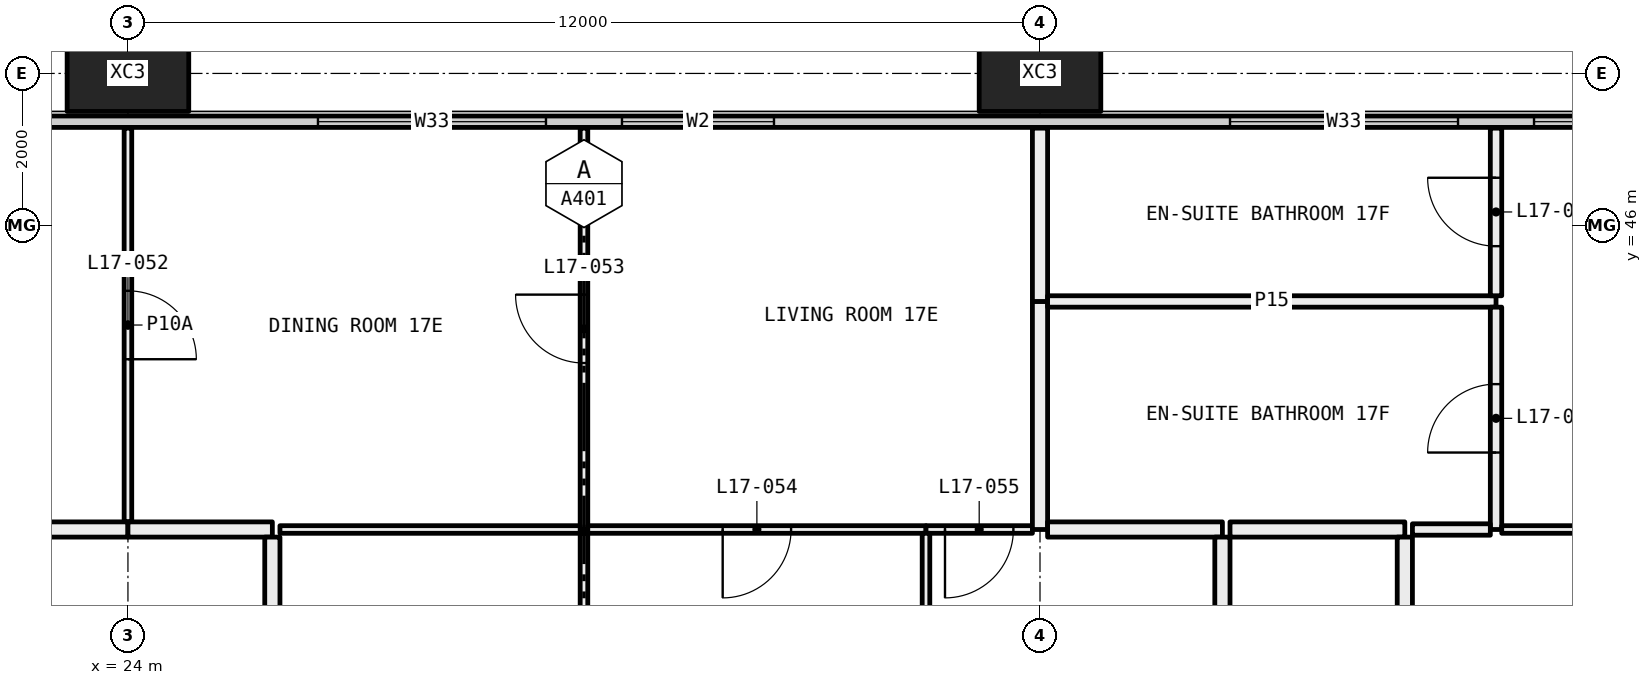
"""IFC4 building model, lengths in metres.
Left out: names, types, materials, properties, quantities, classifications, styles, units other than length and angle.
Written with IfcOpenShell. Run it as: python <this file> out.ifc"""

import sys

from ifc_helpers import new_model, si_unit, direction, frame, frame_2d, origin, origin_2d, place, context, subcontext, project, spatial, rectangle, hollow_rectangle, extrude, element, fill, save


model = new_model("IFC4")
c1 = context("Model", 3, precision=1e-05, world=origin(), true_north=direction((0.0, 1.0)))
c2 = subcontext(c1, "Body", "Model", "MODEL_VIEW")
j1 = project(units=[si_unit("LENGTHUNIT", "METRE"), si_unit("PLANEANGLEUNIT", "RADIAN")], contexts=[c1])
p1 = place(None, origin())
s1 = spatial("IfcSite", under=j1, at=p1, CompositionType="ELEMENT")
p2 = place(p1, origin())
s2 = spatial("IfcBuilding", under=s1, at=p2, CompositionType="ELEMENT")
p3 = place(p2, frame((0.0, 0.0, 71.4)))
s3 = spatial("IfcBuildingStorey", under=s2, at=p3, CompositionType="ELEMENT", Elevation=71.4)
for number, where, z_axis, x_axis in (
    (1, (24.0, 48.0, -0.4), (0.0, 0.0, 1.0), (1.0, 0.0, 0.0)),
    (2, (36.0, 48.0, -0.4), (0.0, 0.0, 1.0), (1.0, 0.0, 0.0)),
):
    element("IfcColumn", number, at=place(p3, frame(where, z_axis=z_axis, x_axis=x_axis)), inside=s3, PredefinedType="COLUMN", context=c2, shape_type="SweptSolid", body=[
        extrude(hollow_rectangle(XDim=1.6, YDim=1.0, WallThickness=0.065, at=origin_2d()), origin(), (0.0, 0.0, 1.0), 3.45),
    ])
p4 = place(p3, frame((6.56, 47.365, 0.0), z_axis=(0.0, 0.0, 1.0), x_axis=(1.0, 0.0, 0.0)))
e3 = element("IfcWall", 3, at=p4, inside=s3, PredefinedType="ELEMENTEDWALL", context=c2, shape_type="SweptSolid", body=[
    extrude(rectangle(XDim=58.88, YDim=0.15, at=frame_2d((29.44, 0.0))), origin(), (0.0, 0.0, 1.0), 3.05),
])
p5 = place(p4, frame((0.44, 0.0, 0.45)))
e4 = element("IfcOpeningElement", 4, at=p5, cuts=e3, PredefinedType="OPENING", context=c2, shape_type="SweptSolid", body=[
    extrude(rectangle(XDim=4.5, YDim=2.55, at=frame_2d((2.25, 1.275))), frame((0.0, 0.085, 0.0), z_axis=(0.0, -1.0, 0.0), x_axis=(1.0, 0.0, 0.0)), (0.0, 0.0, 1.0), 0.17),
])
p6 = place(p4, frame((7.94, 0.0, 0.45)))
e5 = element("IfcOpeningElement", 5, at=p6, cuts=e3, PredefinedType="OPENING", context=c2, shape_type="SweptSolid", body=[
    extrude(rectangle(XDim=3.0, YDim=2.55, at=frame_2d((1.5, 1.275))), frame((0.0, 0.085, 0.0), z_axis=(0.0, -1.0, 0.0), x_axis=(1.0, 0.0, 0.0)), (0.0, 0.0, 1.0), 0.17),
])
p7 = place(p4, frame((11.94, 0.0, 0.45)))
e6 = element("IfcOpeningElement", 6, at=p7, cuts=e3, PredefinedType="OPENING", context=c2, shape_type="SweptSolid", body=[
    extrude(rectangle(XDim=3.0, YDim=2.55, at=frame_2d((1.5, 1.275))), frame((0.0, 0.085, 0.0), z_axis=(0.0, -1.0, 0.0), x_axis=(1.0, 0.0, 0.0)), (0.0, 0.0, 1.0), 0.17),
])
p8 = place(p4, frame((19.94, 0.0, 0.45)))
e7 = element("IfcOpeningElement", 7, at=p8, cuts=e3, PredefinedType="OPENING", context=c2, shape_type="SweptSolid", body=[
    extrude(rectangle(XDim=3.0, YDim=2.55, at=frame_2d((1.5, 1.275))), frame((0.0, 0.085, 0.0), z_axis=(0.0, -1.0, 0.0), x_axis=(1.0, 0.0, 0.0)), (0.0, 0.0, 1.0), 0.17),
])
p9 = place(p4, frame((23.94, 0.0, 0.45)))
e8 = element("IfcOpeningElement", 8, at=p9, cuts=e3, PredefinedType="OPENING", context=c2, shape_type="SweptSolid", body=[
    extrude(rectangle(XDim=2.0, YDim=2.55, at=frame_2d((1.0, 1.275))), frame((0.0, 0.085, 0.0), z_axis=(0.0, -1.0, 0.0), x_axis=(1.0, 0.0, 0.0)), (0.0, 0.0, 1.0), 0.17),
])
p10 = place(p4, frame((31.94, 0.0, 0.45)))
e9 = element("IfcOpeningElement", 9, at=p10, cuts=e3, PredefinedType="OPENING", context=c2, shape_type="SweptSolid", body=[
    extrude(rectangle(XDim=3.0, YDim=2.55, at=frame_2d((1.5, 1.275))), frame((0.0, 0.085, 0.0), z_axis=(0.0, -1.0, 0.0), x_axis=(1.0, 0.0, 0.0)), (0.0, 0.0, 1.0), 0.17),
])
p11 = place(p4, frame((35.94, 0.0, 0.45)))
e10 = element("IfcOpeningElement", 10, at=p11, cuts=e3, PredefinedType="OPENING", context=c2, shape_type="SweptSolid", body=[
    extrude(rectangle(XDim=3.0, YDim=2.55, at=frame_2d((1.5, 1.275))), frame((0.0, 0.085, 0.0), z_axis=(0.0, -1.0, 0.0), x_axis=(1.0, 0.0, 0.0)), (0.0, 0.0, 1.0), 0.17),
])
p12 = place(p4, frame((43.94, 0.0, 0.45)))
e11 = element("IfcOpeningElement", 11, at=p12, cuts=e3, PredefinedType="OPENING", context=c2, shape_type="SweptSolid", body=[
    extrude(rectangle(XDim=3.0, YDim=2.55, at=frame_2d((1.5, 1.275))), frame((0.0, 0.085, 0.0), z_axis=(0.0, -1.0, 0.0), x_axis=(1.0, 0.0, 0.0)), (0.0, 0.0, 1.0), 0.17),
])
p13 = place(p4, frame((47.94, 0.0, 0.45)))
e12 = element("IfcOpeningElement", 12, at=p13, cuts=e3, PredefinedType="OPENING", context=c2, shape_type="SweptSolid", body=[
    extrude(rectangle(XDim=2.0, YDim=2.55, at=frame_2d((1.0, 1.275))), frame((0.0, 0.085, 0.0), z_axis=(0.0, -1.0, 0.0), x_axis=(1.0, 0.0, 0.0)), (0.0, 0.0, 1.0), 0.17),
])
p14 = place(p4, frame((53.94, 0.0, 0.45)))
e13 = element("IfcOpeningElement", 13, at=p14, cuts=e3, PredefinedType="OPENING", context=c2, shape_type="SweptSolid", body=[
    extrude(rectangle(XDim=4.5, YDim=2.55, at=frame_2d((2.25, 1.275))), frame((0.0, 0.085, 0.0), z_axis=(0.0, -1.0, 0.0), x_axis=(1.0, 0.0, 0.0)), (0.0, 0.0, 1.0), 0.17),
])
p15 = place(p3, frame((24.0, 42.1, 0.0), z_axis=(0.0, 0.0, 1.0), x_axis=(0.0, 1.0, 0.0)))
e14 = element("IfcWall", 14, at=p15, inside=s3, PredefinedType="PARTITIONING", context=c2, shape_type="SweptSolid", body=[
    extrude(rectangle(XDim=5.18, YDim=0.1, at=frame_2d((2.59, 0.0))), origin(), (0.0, 0.0, 1.0), 3.05),
])
p16 = place(p15, frame((2.14, 0.0, 0.0)))
e15 = element("IfcOpeningElement", 15, at=p16, cuts=e14, PredefinedType="OPENING", context=c2, shape_type="SweptSolid", body=[
    extrude(rectangle(XDim=0.9, YDim=2.1, at=frame_2d((0.45, 1.05))), frame((0.0, 0.06, 0.0), z_axis=(0.0, -1.0, 0.0), x_axis=(1.0, 0.0, 0.0)), (0.0, 0.0, 1.0), 0.12),
])
p17 = place(p3, frame((18.0, 42.0, 0.0), z_axis=(0.0, 0.0, 1.0), x_axis=(1.0, 0.0, 0.0)))
e16 = element("IfcWall", 16, at=p17, inside=s3, PredefinedType="PARTITIONING", context=c2, shape_type="SweptSolid", body=[
    extrude(rectangle(XDim=6.0, YDim=0.2, at=frame_2d((3.0, 0.0))), origin(), (0.0, 0.0, 1.0), 3.05),
])
p18 = place(p17, frame((2.5, 0.0, 0.0)))
e17 = element("IfcOpeningElement", 17, at=p18, cuts=e16, PredefinedType="OPENING", context=c2, shape_type="SweptSolid", body=[
    extrude(rectangle(XDim=1.0, YDim=2.1, at=frame_2d((0.5, 1.05))), frame((0.0, 0.11, 0.0), z_axis=(0.0, -1.0, 0.0), x_axis=(1.0, 0.0, 0.0)), (0.0, 0.0, 1.0), 0.22),
])
p19 = place(p3, frame((30.0, 42.0, 0.0), z_axis=(0.0, 0.0, 1.0), x_axis=(0.0, 1.0, 0.0)))
e18 = element("IfcWall", 18, at=p19, inside=s3, PredefinedType="PARTITIONING", context=c2, shape_type="SweptSolid", body=[
    extrude(rectangle(XDim=5.28, YDim=0.1, at=frame_2d((2.64, 0.0))), origin(), (0.0, 0.0, 1.0), 3.05),
])
p20 = place(p19, frame((2.19, 0.0, 0.0)))
e19 = element("IfcOpeningElement", 19, at=p20, cuts=e18, PredefinedType="OPENING", context=c2, shape_type="SweptSolid", body=[
    extrude(rectangle(XDim=0.9, YDim=2.1, at=frame_2d((0.45, 1.05))), frame((0.0, 0.06, 0.0), z_axis=(0.0, -1.0, 0.0), x_axis=(1.0, 0.0, 0.0)), (0.0, 0.0, 1.0), 0.12),
])
p21 = place(p3, frame((26.0, 42.0, 0.0), z_axis=(0.0, 0.0, 1.0), x_axis=(1.0, 0.0, 0.0)))
e20 = element("IfcWall", 20, at=p21, inside=s3, PredefinedType="PARTITIONING", context=c2, shape_type="SweptSolid", body=[
    extrude(rectangle(XDim=3.95, YDim=0.1, at=frame_2d((1.975, 0.0))), origin(), (0.0, 0.0, 1.0), 3.05),
])
p22 = place(p3, frame((24.0, 42.0, 0.0), z_axis=(0.0, 0.0, 1.0), x_axis=(1.0, 0.0, 0.0)))
e21 = element("IfcWall", 21, at=p22, inside=s3, PredefinedType="PARTITIONING", context=c2, shape_type="SweptSolid", body=[
    extrude(rectangle(XDim=1.9, YDim=0.2, at=frame_2d((0.95, 0.0))), origin(), (0.0, 0.0, 1.0), 3.05),
])
p23 = place(p3, frame((30.05, 42.0, 0.0), z_axis=(0.0, 0.0, 1.0), x_axis=(1.0, 0.0, 0.0)))
e22 = element("IfcWall", 22, at=p23, inside=s3, PredefinedType="PARTITIONING", context=c2, shape_type="SweptSolid", body=[
    extrude(rectangle(XDim=4.45, YDim=0.1, at=frame_2d((2.225, 0.0))), origin(), (0.0, 0.0, 1.0), 3.05),
])
p24 = place(p23, frame((1.775, 0.0, 0.0)))
e23 = element("IfcOpeningElement", 23, at=p24, cuts=e22, PredefinedType="OPENING", context=c2, shape_type="SweptSolid", body=[
    extrude(rectangle(XDim=0.9, YDim=2.1, at=frame_2d((0.45, 1.05))), frame((0.0, 0.06, 0.0), z_axis=(0.0, -1.0, 0.0), x_axis=(1.0, 0.0, 0.0)), (0.0, 0.0, 1.0), 0.12),
])
p25 = place(p3, frame((34.5, 42.0, 0.0), z_axis=(0.0, 0.0, 1.0), x_axis=(1.0, 0.0, 0.0)))
e24 = element("IfcWall", 24, at=p25, inside=s3, PredefinedType="PARTITIONING", context=c2, shape_type="SweptSolid", body=[
    extrude(rectangle(XDim=1.4, YDim=0.1, at=frame_2d((0.7, 0.0))), origin(), (0.0, 0.0, 1.0), 3.05),
])
p26 = place(p25, frame((0.25, 0.0, 0.0)))
e25 = element("IfcOpeningElement", 25, at=p26, cuts=e24, PredefinedType="OPENING", context=c2, shape_type="SweptSolid", body=[
    extrude(rectangle(XDim=0.9, YDim=2.1, at=frame_2d((0.45, 1.05))), frame((0.0, 0.06, 0.0), z_axis=(0.0, -1.0, 0.0), x_axis=(1.0, 0.0, 0.0)), (0.0, 0.0, 1.0), 0.12),
])
p27 = place(p3, frame((36.0, 42.0, 0.0), z_axis=(0.0, 0.0, 1.0), x_axis=(0.0, 1.0, 0.0)))
e26 = element("IfcWall", 26, at=p27, inside=s3, PredefinedType="PARTITIONING", context=c2, shape_type="SweptSolid", body=[
    extrude(rectangle(XDim=3.0, YDim=0.2, at=frame_2d((1.5, 0.0))), origin(), (0.0, 0.0, 1.0), 2.45),
])
p28 = place(p3, frame((36.0, 45.0, 0.0), z_axis=(0.0, 0.0, 1.0), x_axis=(0.0, 1.0, 0.0)))
e27 = element("IfcWall", 27, at=p28, inside=s3, PredefinedType="PARTITIONING", context=c2, shape_type="SweptSolid", body=[
    extrude(rectangle(XDim=2.28, YDim=0.2, at=frame_2d((1.14, 0.0))), origin(), (0.0, 0.0, 1.0), 2.45),
])
p29 = place(p3, frame((30.0, 36.1, 0.0), z_axis=(0.0, 0.0, 1.0), x_axis=(0.0, 1.0, 0.0)))
e28 = element("IfcWall", 28, at=p29, inside=s3, PredefinedType="PARTITIONING", context=c2, shape_type="SweptSolid", body=[
    extrude(rectangle(XDim=5.85, YDim=0.1, at=frame_2d((2.925, 0.0))), origin(), (0.0, 0.0, 1.0), 3.05),
])
p30 = place(p29, frame((2.475, 0.0, 0.0)))
e29 = element("IfcOpeningElement", 29, at=p30, cuts=e28, PredefinedType="OPENING", context=c2, shape_type="SweptSolid", body=[
    extrude(rectangle(XDim=0.9, YDim=2.1, at=frame_2d((0.45, 1.05))), frame((0.0, 0.06, 0.0), z_axis=(0.0, -1.0, 0.0), x_axis=(1.0, 0.0, 0.0)), (0.0, 0.0, 1.0), 0.12),
])
p31 = place(p3, frame((25.9, 41.9, 0.0), z_axis=(0.0, 0.0, 1.0), x_axis=(0.0, -1.0, 0.0)))
e30 = element("IfcWall", 30, at=p31, inside=s3, PredefinedType="PARTITIONING", context=c2, shape_type="SweptSolid", body=[
    extrude(rectangle(XDim=6.2, YDim=0.2, at=frame_2d((3.1, 0.0))), origin(), (0.0, 0.0, 1.0), 2.45),
])
p32 = place(p3, frame((34.5, 36.1, 0.0), z_axis=(0.0, 0.0, 1.0), x_axis=(0.0, 1.0, 0.0)))
e31 = element("IfcWall", 31, at=p32, inside=s3, PredefinedType="PARTITIONING", context=c2, shape_type="SweptSolid", body=[
    extrude(rectangle(XDim=5.85, YDim=0.1, at=frame_2d((2.925, 0.0))), origin(), (0.0, 0.0, 1.0), 3.05),
])
p33 = place(p3, frame((38.4, 42.0, 0.0), z_axis=(0.0, 0.0, 1.0), x_axis=(-1.0, 0.0, 0.0)))
e32 = element("IfcWall", 32, at=p33, inside=s3, PredefinedType="PARTITIONING", context=c2, shape_type="SweptSolid", body=[
    extrude(rectangle(XDim=2.3, YDim=0.2, at=frame_2d((1.15, 0.0))), origin(), (0.0, 0.0, 1.0), 3.05),
])
p34 = place(p3, frame((38.4, 36.1, 0.0), z_axis=(0.0, 0.0, 1.0), x_axis=(0.0, 1.0, 0.0)))
e33 = element("IfcWall", 33, at=p34, inside=s3, PredefinedType="PARTITIONING", context=c2, shape_type="SweptSolid", body=[
    extrude(rectangle(XDim=5.8, YDim=0.2, at=frame_2d((2.9, 0.0))), origin(), (0.0, 0.0, 1.0), 3.05),
])
p35 = place(p3, frame((42.0, 45.0, 0.0), z_axis=(0.0, 0.0, 1.0), x_axis=(-1.0, 0.0, 0.0)))
e34 = element("IfcWall", 34, at=p35, inside=s3, PredefinedType="PARTITIONING", context=c2, shape_type="SweptSolid", body=[
    extrude(rectangle(XDim=5.9, YDim=0.15, at=frame_2d((2.95, 0.0))), origin(), (0.0, 0.0, 1.0), 3.05),
])
p36 = place(p3, frame((42.0, 42.0, 0.0), z_axis=(0.0, 0.0, 1.0), x_axis=(0.0, 1.0, 0.0)))
e35 = element("IfcWall", 35, at=p36, inside=s3, PredefinedType="PARTITIONING", context=c2, shape_type="SweptSolid", body=[
    extrude(rectangle(XDim=2.925, YDim=0.15, at=frame_2d((1.462, 0.0))), origin(), (0.0, 0.0, 1.0), 3.05),
])
p37 = place(p36, frame((1.012, 0.0, 0.0)))
e36 = element("IfcOpeningElement", 36, at=p37, cuts=e35, PredefinedType="OPENING", context=c2, shape_type="SweptSolid", body=[
    extrude(rectangle(XDim=0.9, YDim=2.1, at=frame_2d((0.45, 1.05))), frame((0.0, 0.085, 0.0), z_axis=(0.0, -1.0, 0.0), x_axis=(1.0, 0.0, 0.0)), (0.0, 0.0, 1.0), 0.17),
])
p38 = place(p3, frame((40.9, 42.0, 0.0), z_axis=(0.0, 0.0, 1.0), x_axis=(1.0, 0.0, 0.0)))
e37 = element("IfcWall", 37, at=p38, inside=s3, PredefinedType="PARTITIONING", context=c2, shape_type="SweptSolid", body=[
    extrude(rectangle(XDim=1.025, YDim=0.15, at=frame_2d((0.513, 0.0))), origin(), (0.0, 0.0, 1.0), 3.05),
])
p39 = place(p3, frame((38.5, 42.0, 0.0), z_axis=(0.0, 0.0, 1.0), x_axis=(1.0, 0.0, 0.0)))
e38 = element("IfcWall", 38, at=p39, inside=s3, PredefinedType="PARTITIONING", context=c2, shape_type="SweptSolid", body=[
    extrude(rectangle(XDim=2.3, YDim=0.2, at=frame_2d((1.15, 0.0))), origin(), (0.0, 0.0, 1.0), 3.05),
])
p40 = place(p3, frame((42.0, 45.075, 0.0), z_axis=(0.0, 0.0, 1.0), x_axis=(0.0, 1.0, 0.0)))
e39 = element("IfcWall", 39, at=p40, inside=s3, PredefinedType="PARTITIONING", context=c2, shape_type="SweptSolid", body=[
    extrude(rectangle(XDim=2.205, YDim=0.15, at=frame_2d((1.103, 0.0))), origin(), (0.0, 0.0, 1.0), 3.05),
])
p41 = place(p40, frame((0.653, 0.0, 0.0)))
e40 = element("IfcOpeningElement", 40, at=p41, cuts=e39, PredefinedType="OPENING", context=c2, shape_type="SweptSolid", body=[
    extrude(rectangle(XDim=0.9, YDim=2.1, at=frame_2d((0.45, 1.05))), frame((0.0, 0.085, 0.0), z_axis=(0.0, -1.0, 0.0), x_axis=(1.0, 0.0, 0.0)), (0.0, 0.0, 1.0), 0.17),
])
p42 = place(p3, frame((42.075, 42.0, 0.0), z_axis=(0.0, 0.0, 1.0), x_axis=(1.0, 0.0, 0.0)))
e41 = element("IfcWall", 41, at=p42, inside=s3, PredefinedType="PARTITIONING", context=c2, shape_type="SweptSolid", body=[
    extrude(rectangle(XDim=3.925, YDim=0.1, at=frame_2d((1.962, 0.0))), origin(), (0.0, 0.0, 1.0), 3.05),
])
p43 = place(p42, frame((1.512, 0.0, 0.0)))
e42 = element("IfcOpeningElement", 42, at=p43, cuts=e41, PredefinedType="OPENING", context=c2, shape_type="SweptSolid", body=[
    extrude(rectangle(XDim=0.9, YDim=2.1, at=frame_2d((0.45, 1.05))), frame((0.0, 0.06, 0.0), z_axis=(0.0, -1.0, 0.0), x_axis=(1.0, 0.0, 0.0)), (0.0, 0.0, 1.0), 0.12),
])
p44 = place(p3, frame((40.8, 41.9, 0.0), z_axis=(0.0, 0.0, 1.0), x_axis=(0.0, -1.0, 0.0)))
e43 = element("IfcWall", 43, at=p44, inside=s3, PredefinedType="PARTITIONING", context=c2, shape_type="SweptSolid", body=[
    extrude(rectangle(XDim=6.2, YDim=0.2, at=frame_2d((3.1, 0.0))), origin(), (0.0, 0.0, 1.0), 2.45),
])
p45 = place(p8, origin())
e44 = element("IfcWindow", 44, at=p45, inside=s3, PartitioningType="SINGLE_PANEL", PredefinedType="WINDOW", context=c2, shape_type="SweptSolid", body=[
    extrude(rectangle(XDim=3.0, YDim=2.55, at=frame_2d((1.5, 1.275))), frame((0.0, 0.03, 0.0), z_axis=(0.0, -1.0, 0.0), x_axis=(1.0, 0.0, 0.0)), (0.0, 0.0, 1.0), 0.06),
])
fill(e7, e44)
p46 = place(p9, origin())
e45 = element("IfcWindow", 45, at=p46, inside=s3, PartitioningType="SINGLE_PANEL", PredefinedType="WINDOW", context=c2, shape_type="SweptSolid", body=[
    extrude(rectangle(XDim=2.0, YDim=2.55, at=frame_2d((1.0, 1.275))), frame((0.0, 0.03, 0.0), z_axis=(0.0, -1.0, 0.0), x_axis=(1.0, 0.0, 0.0)), (0.0, 0.0, 1.0), 0.06),
])
fill(e8, e45)
p47 = place(p10, origin())
e46 = element("IfcWindow", 46, at=p47, inside=s3, PartitioningType="SINGLE_PANEL", PredefinedType="WINDOW", context=c2, shape_type="SweptSolid", body=[
    extrude(rectangle(XDim=3.0, YDim=2.55, at=frame_2d((1.5, 1.275))), frame((0.0, 0.03, 0.0), z_axis=(0.0, -1.0, 0.0), x_axis=(1.0, 0.0, 0.0)), (0.0, 0.0, 1.0), 0.06),
])
fill(e9, e46)
p48 = place(p11, origin())
e47 = element("IfcWindow", 47, at=p48, inside=s3, PartitioningType="SINGLE_PANEL", PredefinedType="WINDOW", context=c2, shape_type="SweptSolid", body=[
    extrude(rectangle(XDim=3.0, YDim=2.55, at=frame_2d((1.5, 1.275))), frame((0.0, 0.03, 0.0), z_axis=(0.0, -1.0, 0.0), x_axis=(1.0, 0.0, 0.0)), (0.0, 0.0, 1.0), 0.06),
])
fill(e10, e47)
p49 = place(p16, frame((0.9, 0.0, 0.0), x_axis=(-1.0, 0.0, 0.0)))
e48 = element("IfcDoor", 48, at=p49, inside=s3, OperationType="SINGLE_SWING_LEFT", PredefinedType="DOOR", context=c2, shape_type="SweptSolid", body=[
    extrude(rectangle(XDim=0.9, YDim=2.1, at=frame_2d((0.45, 1.05))), frame((0.0, 0.025, 0.0), z_axis=(0.0, -1.0, 0.0), x_axis=(1.0, 0.0, 0.0)), (0.0, 0.0, 1.0), 0.05),
])
fill(e15, e48)
p50 = place(p20, origin())
e49 = element("IfcDoor", 49, at=p50, inside=s3, OperationType="SINGLE_SWING_LEFT", PredefinedType="DOOR", context=c2, shape_type="SweptSolid", body=[
    extrude(rectangle(XDim=0.9, YDim=2.1, at=frame_2d((0.45, 1.05))), frame((0.0, 0.025, 0.0), z_axis=(0.0, -1.0, 0.0), x_axis=(1.0, 0.0, 0.0)), (0.0, 0.0, 1.0), 0.05),
])
fill(e19, e49)
p51 = place(p24, frame((0.9, 0.0, 0.0), x_axis=(-1.0, 0.0, 0.0)))
e50 = element("IfcDoor", 50, at=p51, inside=s3, OperationType="SINGLE_SWING_LEFT", PredefinedType="DOOR", context=c2, shape_type="SweptSolid", body=[
    extrude(rectangle(XDim=0.9, YDim=2.1, at=frame_2d((0.45, 1.05))), frame((0.0, 0.025, 0.0), z_axis=(0.0, -1.0, 0.0), x_axis=(1.0, 0.0, 0.0)), (0.0, 0.0, 1.0), 0.05),
])
fill(e23, e50)
p52 = place(p26, frame((0.9, 0.0, 0.0), x_axis=(-1.0, 0.0, 0.0)))
e51 = element("IfcDoor", 51, at=p52, inside=s3, OperationType="SINGLE_SWING_LEFT", PredefinedType="DOOR", context=c2, shape_type="SweptSolid", body=[
    extrude(rectangle(XDim=0.9, YDim=2.1, at=frame_2d((0.45, 1.05))), frame((0.0, 0.025, 0.0), z_axis=(0.0, -1.0, 0.0), x_axis=(1.0, 0.0, 0.0)), (0.0, 0.0, 1.0), 0.05),
])
fill(e25, e51)
p53 = place(p37, origin())
e52 = element("IfcDoor", 52, at=p53, inside=s3, OperationType="SINGLE_SWING_RIGHT", PredefinedType="DOOR", context=c2, shape_type="SweptSolid", body=[
    extrude(rectangle(XDim=0.9, YDim=2.1, at=frame_2d((0.45, 1.05))), frame((0.0, 0.025, 0.0), z_axis=(0.0, -1.0, 0.0), x_axis=(1.0, 0.0, 0.0)), (0.0, 0.0, 1.0), 0.05),
])
fill(e36, e52)
p54 = place(p41, origin())
e53 = element("IfcDoor", 53, at=p54, inside=s3, OperationType="SINGLE_SWING_LEFT", PredefinedType="DOOR", context=c2, shape_type="SweptSolid", body=[
    extrude(rectangle(XDim=0.9, YDim=2.1, at=frame_2d((0.45, 1.05))), frame((0.0, 0.025, 0.0), z_axis=(0.0, -1.0, 0.0), x_axis=(1.0, 0.0, 0.0)), (0.0, 0.0, 1.0), 0.05),
])
fill(e40, e53)
save(model, sys.argv[1])
